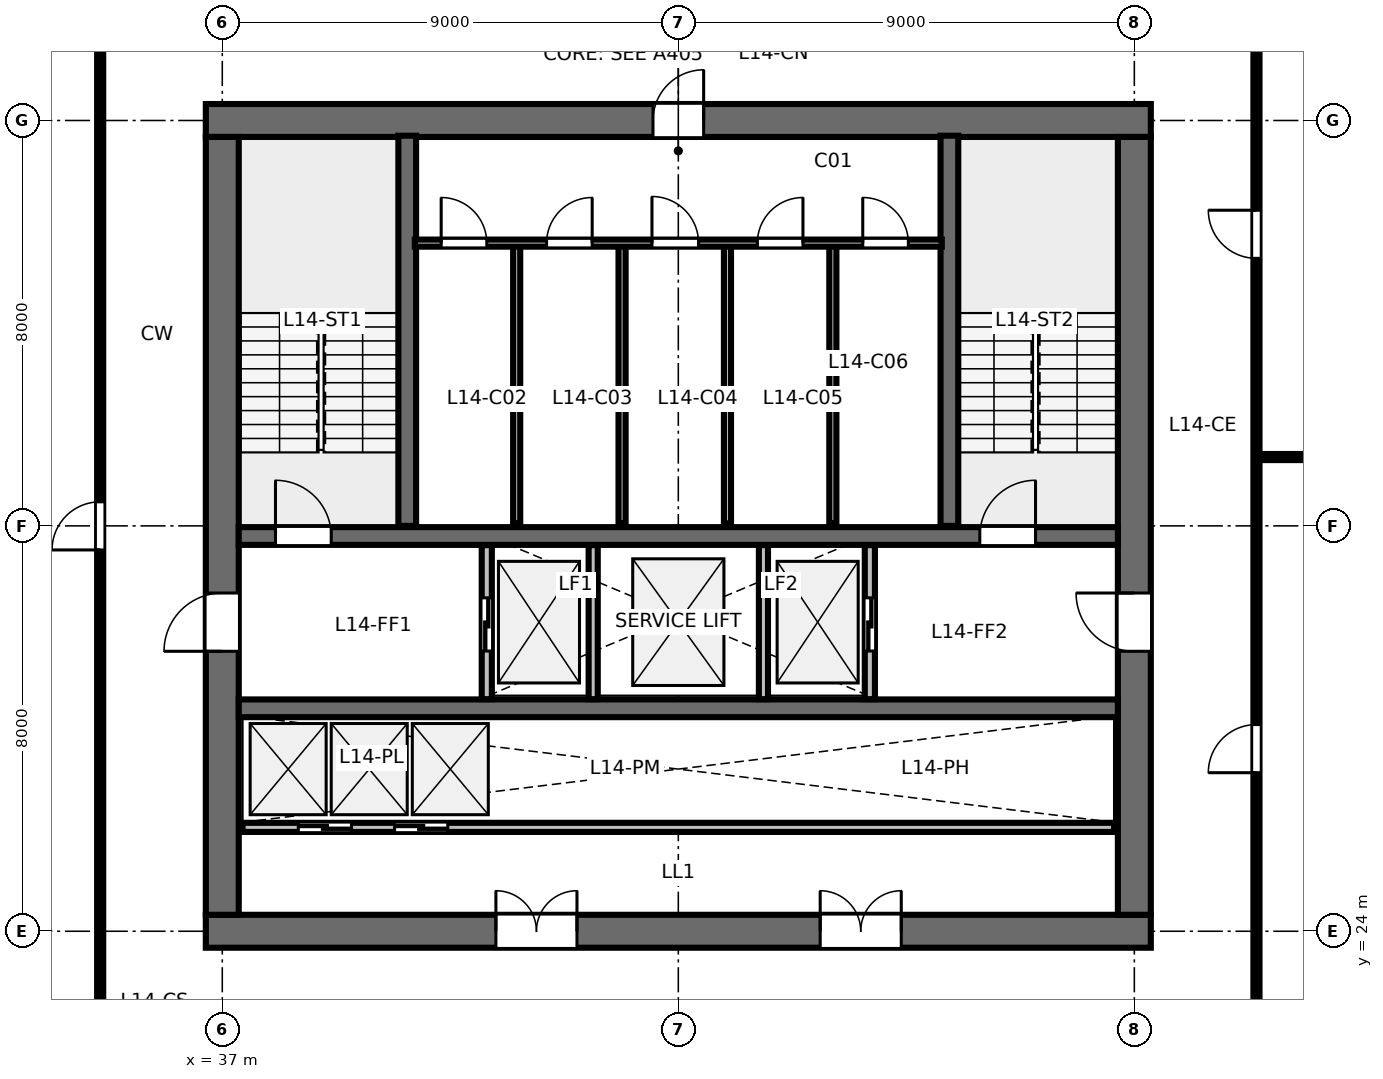
"""IFC4 building model, lengths in metres.
Left out: names, types, materials, properties, quantities, classifications, styles, units other than length and angle.
Written with IfcOpenShell. Run it as: python <this file> out.ifc"""

import sys

from ifc_helpers import new_model, si_unit, direction, frame, frame_2d, origin, place, context, subcontext, project, spatial, rectangle, extrude, element, fill, save


model = new_model("IFC4")
c1 = context("Model", 3, precision=1e-05, world=origin(), true_north=direction((0.0, 1.0)))
c2 = subcontext(c1, "Body", "Model", "MODEL_VIEW")
j1 = project(units=[si_unit("LENGTHUNIT", "METRE"), si_unit("PLANEANGLEUNIT", "RADIAN")], contexts=[c1])
p1 = place(None, origin())
s1 = spatial("IfcSite", under=j1, at=p1, CompositionType="ELEMENT")
p2 = place(p1, origin())
s2 = spatial("IfcBuilding", under=s1, at=p2, CompositionType="ELEMENT")
p3 = place(p2, frame((0.0, 0.0, 56.8)))
s3 = spatial("IfcBuildingStorey", under=s2, at=p3, CompositionType="ELEMENT", Elevation=56.8)
p4 = place(p3, frame((36.675, 24.0, 0.0), z_axis=(0.0, 0.0, 1.0), x_axis=(1.0, 0.0, 0.0)))
e1 = element("IfcWall", 1, at=p4, inside=s3, PredefinedType="SHEAR", context=c2, shape_type="SweptSolid", body=[
    extrude(rectangle(XDim=18.65, YDim=0.65, at=frame_2d((9.325, 0.0))), origin(), (0.0, 0.0, 1.0), 3.36),
])
p5 = place(p4, frame((5.725, 0.0, 0.0)))
e2 = element("IfcOpeningElement", 2, at=p5, cuts=e1, PredefinedType="OPENING", context=c2, shape_type="SweptSolid", body=[
    extrude(rectangle(XDim=1.6, YDim=2.15, at=frame_2d((0.8, 1.075))), frame((0.0, 0.335, 0.0), z_axis=(0.0, -1.0, 0.0), x_axis=(1.0, 0.0, 0.0)), (0.0, 0.0, 1.0), 0.67),
])
p6 = place(p4, frame((12.125, 0.0, 0.0)))
e3 = element("IfcOpeningElement", 3, at=p6, cuts=e1, PredefinedType="OPENING", context=c2, shape_type="SweptSolid", body=[
    extrude(rectangle(XDim=1.6, YDim=2.15, at=frame_2d((0.8, 1.075))), frame((0.0, 0.335, 0.0), z_axis=(0.0, -1.0, 0.0), x_axis=(1.0, 0.0, 0.0)), (0.0, 0.0, 1.0), 0.67),
])
p7 = place(p3, frame((36.675, 40.0, 0.0), z_axis=(0.0, 0.0, 1.0), x_axis=(1.0, 0.0, 0.0)))
e4 = element("IfcWall", 4, at=p7, inside=s3, PredefinedType="SHEAR", context=c2, shape_type="SweptSolid", body=[
    extrude(rectangle(XDim=18.65, YDim=0.65, at=frame_2d((9.325, 0.0))), origin(), (0.0, 0.0, 1.0), 3.36),
])
p8 = place(p7, frame((8.825, 0.0, 0.0)))
e5 = element("IfcOpeningElement", 5, at=p8, cuts=e4, PredefinedType="OPENING", context=c2, shape_type="SweptSolid", body=[
    extrude(rectangle(XDim=1.0, YDim=2.15, at=frame_2d((0.5, 1.075))), frame((0.0, 0.335, 0.0), z_axis=(0.0, -1.0, 0.0), x_axis=(1.0, 0.0, 0.0)), (0.0, 0.0, 1.0), 0.67),
])
p9 = place(p3, frame((37.0, 24.325, 0.0), z_axis=(0.0, 0.0, 1.0), x_axis=(0.0, 1.0, 0.0)))
e6 = element("IfcWall", 6, at=p9, inside=s3, PredefinedType="SHEAR", context=c2, shape_type="SweptSolid", body=[
    extrude(rectangle(XDim=15.35, YDim=0.65, at=frame_2d((7.675, 0.0))), origin(), (0.0, 0.0, 1.0), 3.36),
])
p10 = place(p9, frame((5.2, 0.0, 0.0)))
e7 = element("IfcOpeningElement", 7, at=p10, cuts=e6, PredefinedType="OPENING", context=c2, shape_type="SweptSolid", body=[
    extrude(rectangle(XDim=1.15, YDim=2.15, at=frame_2d((0.575, 1.075))), frame((0.0, 0.335, 0.0), z_axis=(0.0, -1.0, 0.0), x_axis=(1.0, 0.0, 0.0)), (0.0, 0.0, 1.0), 0.67),
])
p11 = place(p3, frame((55.0, 24.325, 0.0), z_axis=(0.0, 0.0, 1.0), x_axis=(0.0, 1.0, 0.0)))
e8 = element("IfcWall", 8, at=p11, inside=s3, PredefinedType="SHEAR", context=c2, shape_type="SweptSolid", body=[
    extrude(rectangle(XDim=15.35, YDim=0.65, at=frame_2d((7.675, 0.0))), origin(), (0.0, 0.0, 1.0), 3.36),
])
p12 = place(p11, frame((5.2, 0.0, 0.0)))
e9 = element("IfcOpeningElement", 9, at=p12, cuts=e8, PredefinedType="OPENING", context=c2, shape_type="SweptSolid", body=[
    extrude(rectangle(XDim=1.15, YDim=2.15, at=frame_2d((0.575, 1.075))), frame((0.0, 0.335, 0.0), z_axis=(0.0, -1.0, 0.0), x_axis=(1.0, 0.0, 0.0)), (0.0, 0.0, 1.0), 0.67),
])
p13 = place(p3, frame((37.325, 31.8, 0.0), z_axis=(0.0, 0.0, 1.0), x_axis=(1.0, 0.0, 0.0)))
e10 = element("IfcWall", 10, at=p13, inside=s3, PredefinedType="SHEAR", context=c2, shape_type="SweptSolid", body=[
    extrude(rectangle(XDim=17.35, YDim=0.35, at=frame_2d((8.675, 0.0))), origin(), (0.0, 0.0, 1.0), 3.36),
])
p14 = place(p13, frame((0.725, 0.0, 0.0)))
e11 = element("IfcOpeningElement", 11, at=p14, cuts=e10, PredefinedType="OPENING", context=c2, shape_type="SweptSolid", body=[
    extrude(rectangle(XDim=1.1, YDim=2.15, at=frame_2d((0.55, 1.075))), frame((0.0, 0.185, 0.0), z_axis=(0.0, -1.0, 0.0), x_axis=(1.0, 0.0, 0.0)), (0.0, 0.0, 1.0), 0.37),
])
p15 = place(p13, frame((14.625, 0.0, 0.0)))
e12 = element("IfcOpeningElement", 12, at=p15, cuts=e10, PredefinedType="OPENING", context=c2, shape_type="SweptSolid", body=[
    extrude(rectangle(XDim=1.1, YDim=2.15, at=frame_2d((0.55, 1.075))), frame((0.0, 0.185, 0.0), z_axis=(0.0, -1.0, 0.0), x_axis=(1.0, 0.0, 0.0)), (0.0, 0.0, 1.0), 0.37),
])
p16 = place(p3, frame((37.325, 28.4, 0.0), z_axis=(0.0, 0.0, 1.0), x_axis=(1.0, 0.0, 0.0)))
e13 = element("IfcWall", 13, at=p16, inside=s3, PredefinedType="SHEAR", context=c2, shape_type="SweptSolid", body=[
    extrude(rectangle(XDim=17.35, YDim=0.35, at=frame_2d((8.675, 0.0))), origin(), (0.0, 0.0, 1.0), 3.36),
])
for number, where, z_axis, x_axis in (
    (14, (40.65, 32.0, 0.0), (0.0, 0.0, 1.0), (0.0, 1.0, 0.0)),
    (15, (51.35, 32.0, 0.0), (0.0, 0.0, 1.0), (0.0, 1.0, 0.0)),
):
    element("IfcWall", number, at=place(p3, frame(where, z_axis=z_axis, x_axis=x_axis)), inside=s3, PredefinedType="SHEAR", context=c2, shape_type="SweptSolid", body=[
        extrude(rectangle(XDim=7.7, YDim=0.35, at=frame_2d((3.85, 0.0))), origin(), (0.0, 0.0, 1.0), 3.6),
    ])
for number, where, z_axis, x_axis in (
    (16, (42.81, 32.05, 0.0), (0.0, 0.0, 1.0), (0.0, 1.0, 0.0)),
    (17, (44.89, 32.05, 0.0), (0.0, 0.0, 1.0), (0.0, 1.0, 0.0)),
    (18, (46.97, 32.05, 0.0), (0.0, 0.0, 1.0), (0.0, 1.0, 0.0)),
    (19, (49.05, 32.05, 0.0), (0.0, 0.0, 1.0), (0.0, 1.0, 0.0)),
):
    element("IfcWall", number, at=place(p3, frame(where, z_axis=z_axis, x_axis=x_axis)), inside=s3, PredefinedType="PARTITIONING", context=c2, shape_type="SweptSolid", body=[
        extrude(rectangle(XDim=5.5, YDim=0.14, at=frame_2d((2.75, 0.0))), origin(), (0.0, 0.0, 1.0), 3.36),
    ])
p17 = place(p3, frame((40.8, 37.58, 0.0), z_axis=(0.0, 0.0, 1.0), x_axis=(1.0, 0.0, 0.0)))
e20 = element("IfcWall", 20, at=p17, inside=s3, PredefinedType="PARTITIONING", context=c2, shape_type="SweptSolid", body=[
    extrude(rectangle(XDim=10.4, YDim=0.14, at=frame_2d((5.2, 0.0))), origin(), (0.0, 0.0, 1.0), 3.36),
])
p18 = place(p17, frame((0.52, 0.0, 0.0)))
e21 = element("IfcOpeningElement", 21, at=p18, cuts=e20, PredefinedType="OPENING", context=c2, shape_type="SweptSolid", body=[
    extrude(rectangle(XDim=0.9, YDim=2.15, at=frame_2d((0.45, 1.075))), frame((0.0, 0.08, 0.0), z_axis=(0.0, -1.0, 0.0), x_axis=(1.0, 0.0, 0.0)), (0.0, 0.0, 1.0), 0.16),
])
p19 = place(p17, frame((2.6, 0.0, 0.0)))
e22 = element("IfcOpeningElement", 22, at=p19, cuts=e20, PredefinedType="OPENING", context=c2, shape_type="SweptSolid", body=[
    extrude(rectangle(XDim=0.9, YDim=2.15, at=frame_2d((0.45, 1.075))), frame((0.0, 0.08, 0.0), z_axis=(0.0, -1.0, 0.0), x_axis=(1.0, 0.0, 0.0)), (0.0, 0.0, 1.0), 0.16),
])
p20 = place(p17, frame((4.68, 0.0, 0.0)))
e23 = element("IfcOpeningElement", 23, at=p20, cuts=e20, PredefinedType="OPENING", context=c2, shape_type="SweptSolid", body=[
    extrude(rectangle(XDim=0.92, YDim=2.15, at=frame_2d((0.46, 1.075))), frame((0.0, 0.08, 0.0), z_axis=(0.0, -1.0, 0.0), x_axis=(1.0, 0.0, 0.0)), (0.0, 0.0, 1.0), 0.16),
])
p21 = place(p17, frame((6.76, 0.0, 0.0)))
e24 = element("IfcOpeningElement", 24, at=p21, cuts=e20, PredefinedType="OPENING", context=c2, shape_type="SweptSolid", body=[
    extrude(rectangle(XDim=0.9, YDim=2.15, at=frame_2d((0.45, 1.075))), frame((0.0, 0.08, 0.0), z_axis=(0.0, -1.0, 0.0), x_axis=(1.0, 0.0, 0.0)), (0.0, 0.0, 1.0), 0.16),
])
p22 = place(p17, frame((8.84, 0.0, 0.0)))
e25 = element("IfcOpeningElement", 25, at=p22, cuts=e20, PredefinedType="OPENING", context=c2, shape_type="SweptSolid", body=[
    extrude(rectangle(XDim=0.9, YDim=2.15, at=frame_2d((0.45, 1.075))), frame((0.0, 0.08, 0.0), z_axis=(0.0, -1.0, 0.0), x_axis=(1.0, 0.0, 0.0)), (0.0, 0.0, 1.0), 0.16),
])
p23 = place(p3, frame((42.22, 28.58, 0.0), z_axis=(0.0, 0.0, 1.0), x_axis=(0.0, 1.0, 0.0)))
e26 = element("IfcWall", 26, at=p23, inside=s3, PredefinedType="PARTITIONING", context=c2, shape_type="SweptSolid", body=[
    extrude(rectangle(XDim=3.04, YDim=0.2, at=frame_2d((1.52, 0.0))), origin(), (0.0, 0.0, 1.0), 3.36),
])
p24 = place(p23, frame((0.95, 0.0, 0.0)))
e27 = element("IfcOpeningElement", 27, at=p24, cuts=e26, PredefinedType="OPENING", context=c2, shape_type="SweptSolid", body=[
    extrude(rectangle(XDim=1.05, YDim=2.15, at=frame_2d((0.525, 1.075))), frame((0.0, 0.11, 0.0), z_axis=(0.0, -1.0, 0.0), x_axis=(1.0, 0.0, 0.0)), (0.0, 0.0, 1.0), 0.22),
])
p25 = place(p3, frame((49.78, 28.58, 0.0), z_axis=(0.0, 0.0, 1.0), x_axis=(0.0, 1.0, 0.0)))
e28 = element("IfcWall", 28, at=p25, inside=s3, PredefinedType="PARTITIONING", context=c2, shape_type="SweptSolid", body=[
    extrude(rectangle(XDim=3.04, YDim=0.2, at=frame_2d((1.52, 0.0))), origin(), (0.0, 0.0, 1.0), 3.36),
])
p26 = place(p25, frame((0.95, 0.0, 0.0)))
e29 = element("IfcOpeningElement", 29, at=p26, cuts=e28, PredefinedType="OPENING", context=c2, shape_type="SweptSolid", body=[
    extrude(rectangle(XDim=1.05, YDim=2.15, at=frame_2d((0.525, 1.075))), frame((0.0, 0.11, 0.0), z_axis=(0.0, -1.0, 0.0), x_axis=(1.0, 0.0, 0.0)), (0.0, 0.0, 1.0), 0.22),
])
for number, where, z_axis, x_axis in (
    (30, (44.32, 28.58, 0.0), (0.0, 0.0, 1.0), (0.0, 1.0, 0.0)),
    (31, (47.68, 28.58, 0.0), (0.0, 0.0, 1.0), (0.0, 1.0, 0.0)),
):
    element("IfcWall", number, at=place(p3, frame(where, z_axis=z_axis, x_axis=x_axis)), inside=s3, PredefinedType="PARTITIONING", context=c2, shape_type="SweptSolid", body=[
        extrude(rectangle(XDim=3.04, YDim=0.18, at=frame_2d((1.52, 0.0))), origin(), (0.0, 0.0, 1.0), 3.36),
    ])
p27 = place(p3, frame((37.4, 26.05, 0.0), z_axis=(0.0, 0.0, 1.0), x_axis=(1.0, 0.0, 0.0)))
e32 = element("IfcWall", 32, at=p27, inside=s3, PredefinedType="PARTITIONING", context=c2, shape_type="SweptSolid", body=[
    extrude(rectangle(XDim=17.2, YDim=0.18, at=frame_2d((8.6, 0.0))), origin(), (0.0, 0.0, 1.0), 3.36),
])
p28 = place(p27, frame((1.1, 0.0, 0.0)))
e33 = element("IfcOpeningElement", 33, at=p28, cuts=e32, PredefinedType="OPENING", context=c2, shape_type="SweptSolid", body=[
    extrude(rectangle(XDim=1.05, YDim=2.15, at=frame_2d((0.525, 1.075))), frame((0.0, 0.1, 0.0), z_axis=(0.0, -1.0, 0.0), x_axis=(1.0, 0.0, 0.0)), (0.0, 0.0, 1.0), 0.2),
])
p29 = place(p27, frame((3.0, 0.0, 0.0)))
e34 = element("IfcOpeningElement", 34, at=p29, cuts=e32, PredefinedType="OPENING", context=c2, shape_type="SweptSolid", body=[
    extrude(rectangle(XDim=1.05, YDim=2.15, at=frame_2d((0.525, 1.075))), frame((0.0, 0.1, 0.0), z_axis=(0.0, -1.0, 0.0), x_axis=(1.0, 0.0, 0.0)), (0.0, 0.0, 1.0), 0.2),
])
p30 = place(p3, frame((34.59, 21.65, 0.0), z_axis=(0.0, 0.0, 1.0), x_axis=(0.0, 1.0, 0.0)))
e35 = element("IfcWall", 35, at=p30, inside=s3, PredefinedType="PARTITIONING", context=c2, shape_type="SweptSolid", body=[
    extrude(rectangle(XDim=20.7, YDim=0.12, at=frame_2d((10.35, 0.0))), origin(), (0.0, 0.0, 1.0), 2.64),
])
p31 = place(p30, frame((9.875, 0.0, 0.0)))
e36 = element("IfcOpeningElement", 36, at=p31, cuts=e35, PredefinedType="OPENING", context=c2, shape_type="SweptSolid", body=[
    extrude(rectangle(XDim=0.95, YDim=2.15, at=frame_2d((0.475, 1.075))), frame((0.0, 0.07, 0.0), z_axis=(0.0, -1.0, 0.0), x_axis=(1.0, 0.0, 0.0)), (0.0, 0.0, 1.0), 0.14),
])
p32 = place(p3, frame((57.41, 33.358, 0.0), z_axis=(0.0, 0.0, 1.0), x_axis=(1.0, 0.0, 0.0)))
e37 = element("IfcWall", 37, at=p32, inside=s3, PredefinedType="PARTITIONING", context=c2, shape_type="SweptSolid", body=[
    extrude(rectangle(XDim=12.71, YDim=0.12, at=frame_2d((6.355, 0.0))), origin(), (0.0, 0.0, 1.0), 2.64),
])
p33 = place(p32, frame((1.4, 0.0, 0.0)))
e38 = element("IfcOpeningElement", 38, at=p33, cuts=e37, PredefinedType="OPENING", context=c2, shape_type="SweptSolid", body=[
    extrude(rectangle(XDim=0.9, YDim=2.15, at=frame_2d((0.45, 1.075))), frame((0.0, 0.07, 0.0), z_axis=(0.0, -1.0, 0.0), x_axis=(1.0, 0.0, 0.0)), (0.0, 0.0, 1.0), 0.14),
])
p34 = place(p3, frame((57.41, 21.65, 0.0), z_axis=(0.0, 0.0, 1.0), x_axis=(0.0, 1.0, 0.0)))
e39 = element("IfcWall", 39, at=p34, inside=s3, PredefinedType="PARTITIONING", context=c2, shape_type="SweptSolid", body=[
    extrude(rectangle(XDim=20.7, YDim=0.12, at=frame_2d((10.35, 0.0))), origin(), (0.0, 0.0, 1.0), 2.64),
])
p35 = place(p34, frame((5.479, 0.0, 0.0)))
e40 = element("IfcOpeningElement", 40, at=p35, cuts=e39, PredefinedType="OPENING", context=c2, shape_type="SweptSolid", body=[
    extrude(rectangle(XDim=0.95, YDim=2.15, at=frame_2d((0.475, 1.075))), frame((0.0, 0.07, 0.0), z_axis=(0.0, -1.0, 0.0), x_axis=(1.0, 0.0, 0.0)), (0.0, 0.0, 1.0), 0.14),
])
p36 = place(p34, frame((15.629, 0.0, 0.0)))
e41 = element("IfcOpeningElement", 41, at=p36, cuts=e39, PredefinedType="OPENING", context=c2, shape_type="SweptSolid", body=[
    extrude(rectangle(XDim=0.95, YDim=2.15, at=frame_2d((0.475, 1.075))), frame((0.0, 0.07, 0.0), z_axis=(0.0, -1.0, 0.0), x_axis=(1.0, 0.0, 0.0)), (0.0, 0.0, 1.0), 0.14),
])
p37 = place(p14, origin())
e42 = element("IfcDoor", 42, at=p37, inside=s3, OperationType="SINGLE_SWING_LEFT", PredefinedType="DOOR", context=c2, shape_type="SweptSolid", body=[
    extrude(rectangle(XDim=1.1, YDim=2.15, at=frame_2d((0.55, 1.075))), frame((0.0, 0.025, 0.0), z_axis=(0.0, -1.0, 0.0), x_axis=(1.0, 0.0, 0.0)), (0.0, 0.0, 1.0), 0.05),
])
fill(e11, e42)
p38 = place(p15, origin())
e43 = element("IfcDoor", 43, at=p38, inside=s3, OperationType="SINGLE_SWING_RIGHT", PredefinedType="DOOR", context=c2, shape_type="SweptSolid", body=[
    extrude(rectangle(XDim=1.1, YDim=2.15, at=frame_2d((0.55, 1.075))), frame((0.0, 0.025, 0.0), z_axis=(0.0, -1.0, 0.0), x_axis=(1.0, 0.0, 0.0)), (0.0, 0.0, 1.0), 0.05),
])
fill(e12, e43)
p39 = place(p8, origin())
e44 = element("IfcDoor", 44, at=p39, inside=s3, OperationType="SINGLE_SWING_RIGHT", PredefinedType="DOOR", context=c2, shape_type="SweptSolid", body=[
    extrude(rectangle(XDim=1.0, YDim=2.15, at=frame_2d((0.5, 1.075))), frame((0.0, 0.025, 0.0), z_axis=(0.0, -1.0, 0.0), x_axis=(1.0, 0.0, 0.0)), (0.0, 0.0, 1.0), 0.05),
])
fill(e5, e44)
p40 = place(p10, origin())
e45 = element("IfcDoor", 45, at=p40, inside=s3, OperationType="SINGLE_SWING_LEFT", PredefinedType="DOOR", context=c2, shape_type="SweptSolid", body=[
    extrude(rectangle(XDim=1.15, YDim=2.15, at=frame_2d((0.575, 1.075))), frame((0.0, 0.025, 0.0), z_axis=(0.0, -1.0, 0.0), x_axis=(1.0, 0.0, 0.0)), (0.0, 0.0, 1.0), 0.05),
])
fill(e7, e45)
p41 = place(p12, origin())
e46 = element("IfcDoor", 46, at=p41, inside=s3, OperationType="SINGLE_SWING_RIGHT", PredefinedType="DOOR", context=c2, shape_type="SweptSolid", body=[
    extrude(rectangle(XDim=1.15, YDim=2.15, at=frame_2d((0.575, 1.075))), frame((0.0, 0.025, 0.0), z_axis=(0.0, -1.0, 0.0), x_axis=(1.0, 0.0, 0.0)), (0.0, 0.0, 1.0), 0.05),
])
fill(e9, e46)
p42 = place(p5, origin())
e47 = element("IfcDoor", 47, at=p42, inside=s3, OperationType="DOUBLE_DOOR_SINGLE_SWING", PredefinedType="DOOR", context=c2, shape_type="SweptSolid", body=[
    extrude(rectangle(XDim=1.6, YDim=2.15, at=frame_2d((0.8, 1.075))), frame((0.0, 0.025, 0.0), z_axis=(0.0, -1.0, 0.0), x_axis=(1.0, 0.0, 0.0)), (0.0, 0.0, 1.0), 0.05),
])
fill(e2, e47)
p43 = place(p6, origin())
e48 = element("IfcDoor", 48, at=p43, inside=s3, OperationType="DOUBLE_DOOR_SINGLE_SWING", PredefinedType="DOOR", context=c2, shape_type="SweptSolid", body=[
    extrude(rectangle(XDim=1.6, YDim=2.15, at=frame_2d((0.8, 1.075))), frame((0.0, 0.025, 0.0), z_axis=(0.0, -1.0, 0.0), x_axis=(1.0, 0.0, 0.0)), (0.0, 0.0, 1.0), 0.05),
])
fill(e3, e48)
p44 = place(p18, origin())
e49 = element("IfcDoor", 49, at=p44, inside=s3, OperationType="SINGLE_SWING_LEFT", PredefinedType="DOOR", context=c2, shape_type="SweptSolid", body=[
    extrude(rectangle(XDim=0.9, YDim=2.15, at=frame_2d((0.45, 1.075))), frame((0.0, 0.025, 0.0), z_axis=(0.0, -1.0, 0.0), x_axis=(1.0, 0.0, 0.0)), (0.0, 0.0, 1.0), 0.05),
])
fill(e21, e49)
p45 = place(p19, origin())
e50 = element("IfcDoor", 50, at=p45, inside=s3, OperationType="SINGLE_SWING_RIGHT", PredefinedType="DOOR", context=c2, shape_type="SweptSolid", body=[
    extrude(rectangle(XDim=0.9, YDim=2.15, at=frame_2d((0.45, 1.075))), frame((0.0, 0.025, 0.0), z_axis=(0.0, -1.0, 0.0), x_axis=(1.0, 0.0, 0.0)), (0.0, 0.0, 1.0), 0.05),
])
fill(e22, e50)
p46 = place(p20, origin())
e51 = element("IfcDoor", 51, at=p46, inside=s3, OperationType="SINGLE_SWING_LEFT", PredefinedType="DOOR", context=c2, shape_type="SweptSolid", body=[
    extrude(rectangle(XDim=0.92, YDim=2.15, at=frame_2d((0.46, 1.075))), frame((0.0, 0.025, 0.0), z_axis=(0.0, -1.0, 0.0), x_axis=(1.0, 0.0, 0.0)), (0.0, 0.0, 1.0), 0.05),
])
fill(e23, e51)
p47 = place(p21, origin())
e52 = element("IfcDoor", 52, at=p47, inside=s3, OperationType="SINGLE_SWING_RIGHT", PredefinedType="DOOR", context=c2, shape_type="SweptSolid", body=[
    extrude(rectangle(XDim=0.9, YDim=2.15, at=frame_2d((0.45, 1.075))), frame((0.0, 0.025, 0.0), z_axis=(0.0, -1.0, 0.0), x_axis=(1.0, 0.0, 0.0)), (0.0, 0.0, 1.0), 0.05),
])
fill(e24, e52)
p48 = place(p22, origin())
e53 = element("IfcDoor", 53, at=p48, inside=s3, OperationType="SINGLE_SWING_LEFT", PredefinedType="DOOR", context=c2, shape_type="SweptSolid", body=[
    extrude(rectangle(XDim=0.9, YDim=2.15, at=frame_2d((0.45, 1.075))), frame((0.0, 0.025, 0.0), z_axis=(0.0, -1.0, 0.0), x_axis=(1.0, 0.0, 0.0)), (0.0, 0.0, 1.0), 0.05),
])
fill(e25, e53)
p49 = place(p24, origin())
e54 = element("IfcDoor", 54, at=p49, inside=s3, OperationType="SLIDING_TO_LEFT", PredefinedType="DOOR", context=c2, shape_type="SweptSolid", body=[
    extrude(rectangle(XDim=1.05, YDim=2.15, at=frame_2d((0.525, 1.075))), frame((0.0, 0.025, 0.0), z_axis=(0.0, -1.0, 0.0), x_axis=(1.0, 0.0, 0.0)), (0.0, 0.0, 1.0), 0.05),
])
fill(e27, e54)
p50 = place(p26, origin())
e55 = element("IfcDoor", 55, at=p50, inside=s3, OperationType="SLIDING_TO_RIGHT", PredefinedType="DOOR", context=c2, shape_type="SweptSolid", body=[
    extrude(rectangle(XDim=1.05, YDim=2.15, at=frame_2d((0.525, 1.075))), frame((0.0, 0.025, 0.0), z_axis=(0.0, -1.0, 0.0), x_axis=(1.0, 0.0, 0.0)), (0.0, 0.0, 1.0), 0.05),
])
fill(e29, e55)
p51 = place(p28, origin())
e56 = element("IfcDoor", 56, at=p51, inside=s3, OperationType="SLIDING_TO_LEFT", PredefinedType="DOOR", context=c2, shape_type="SweptSolid", body=[
    extrude(rectangle(XDim=1.05, YDim=2.15, at=frame_2d((0.525, 1.075))), frame((0.0, 0.025, 0.0), z_axis=(0.0, -1.0, 0.0), x_axis=(1.0, 0.0, 0.0)), (0.0, 0.0, 1.0), 0.05),
])
fill(e33, e56)
p52 = place(p29, origin())
e57 = element("IfcDoor", 57, at=p52, inside=s3, OperationType="SLIDING_TO_RIGHT", PredefinedType="DOOR", context=c2, shape_type="SweptSolid", body=[
    extrude(rectangle(XDim=1.05, YDim=2.15, at=frame_2d((0.525, 1.075))), frame((0.0, 0.025, 0.0), z_axis=(0.0, -1.0, 0.0), x_axis=(1.0, 0.0, 0.0)), (0.0, 0.0, 1.0), 0.05),
])
fill(e34, e57)
p53 = place(p31, origin())
e58 = element("IfcDoor", 58, at=p53, inside=s3, OperationType="SINGLE_SWING_LEFT", PredefinedType="DOOR", context=c2, shape_type="SweptSolid", body=[
    extrude(rectangle(XDim=0.95, YDim=2.15, at=frame_2d((0.475, 1.075))), frame((0.0, 0.025, 0.0), z_axis=(0.0, -1.0, 0.0), x_axis=(1.0, 0.0, 0.0)), (0.0, 0.0, 1.0), 0.05),
])
fill(e36, e58)
p54 = place(p35, origin())
e59 = element("IfcDoor", 59, at=p54, inside=s3, OperationType="SINGLE_SWING_LEFT", PredefinedType="DOOR", context=c2, shape_type="SweptSolid", body=[
    extrude(rectangle(XDim=0.95, YDim=2.15, at=frame_2d((0.475, 1.075))), frame((0.0, 0.025, 0.0), z_axis=(0.0, -1.0, 0.0), x_axis=(1.0, 0.0, 0.0)), (0.0, 0.0, 1.0), 0.05),
])
fill(e40, e59)
p55 = place(p36, origin())
e60 = element("IfcDoor", 60, at=p55, inside=s3, OperationType="SINGLE_SWING_RIGHT", PredefinedType="DOOR", context=c2, shape_type="SweptSolid", body=[
    extrude(rectangle(XDim=0.95, YDim=2.15, at=frame_2d((0.475, 1.075))), frame((0.0, 0.025, 0.0), z_axis=(0.0, -1.0, 0.0), x_axis=(1.0, 0.0, 0.0)), (0.0, 0.0, 1.0), 0.05),
])
fill(e41, e60)
save(model, sys.argv[1])
